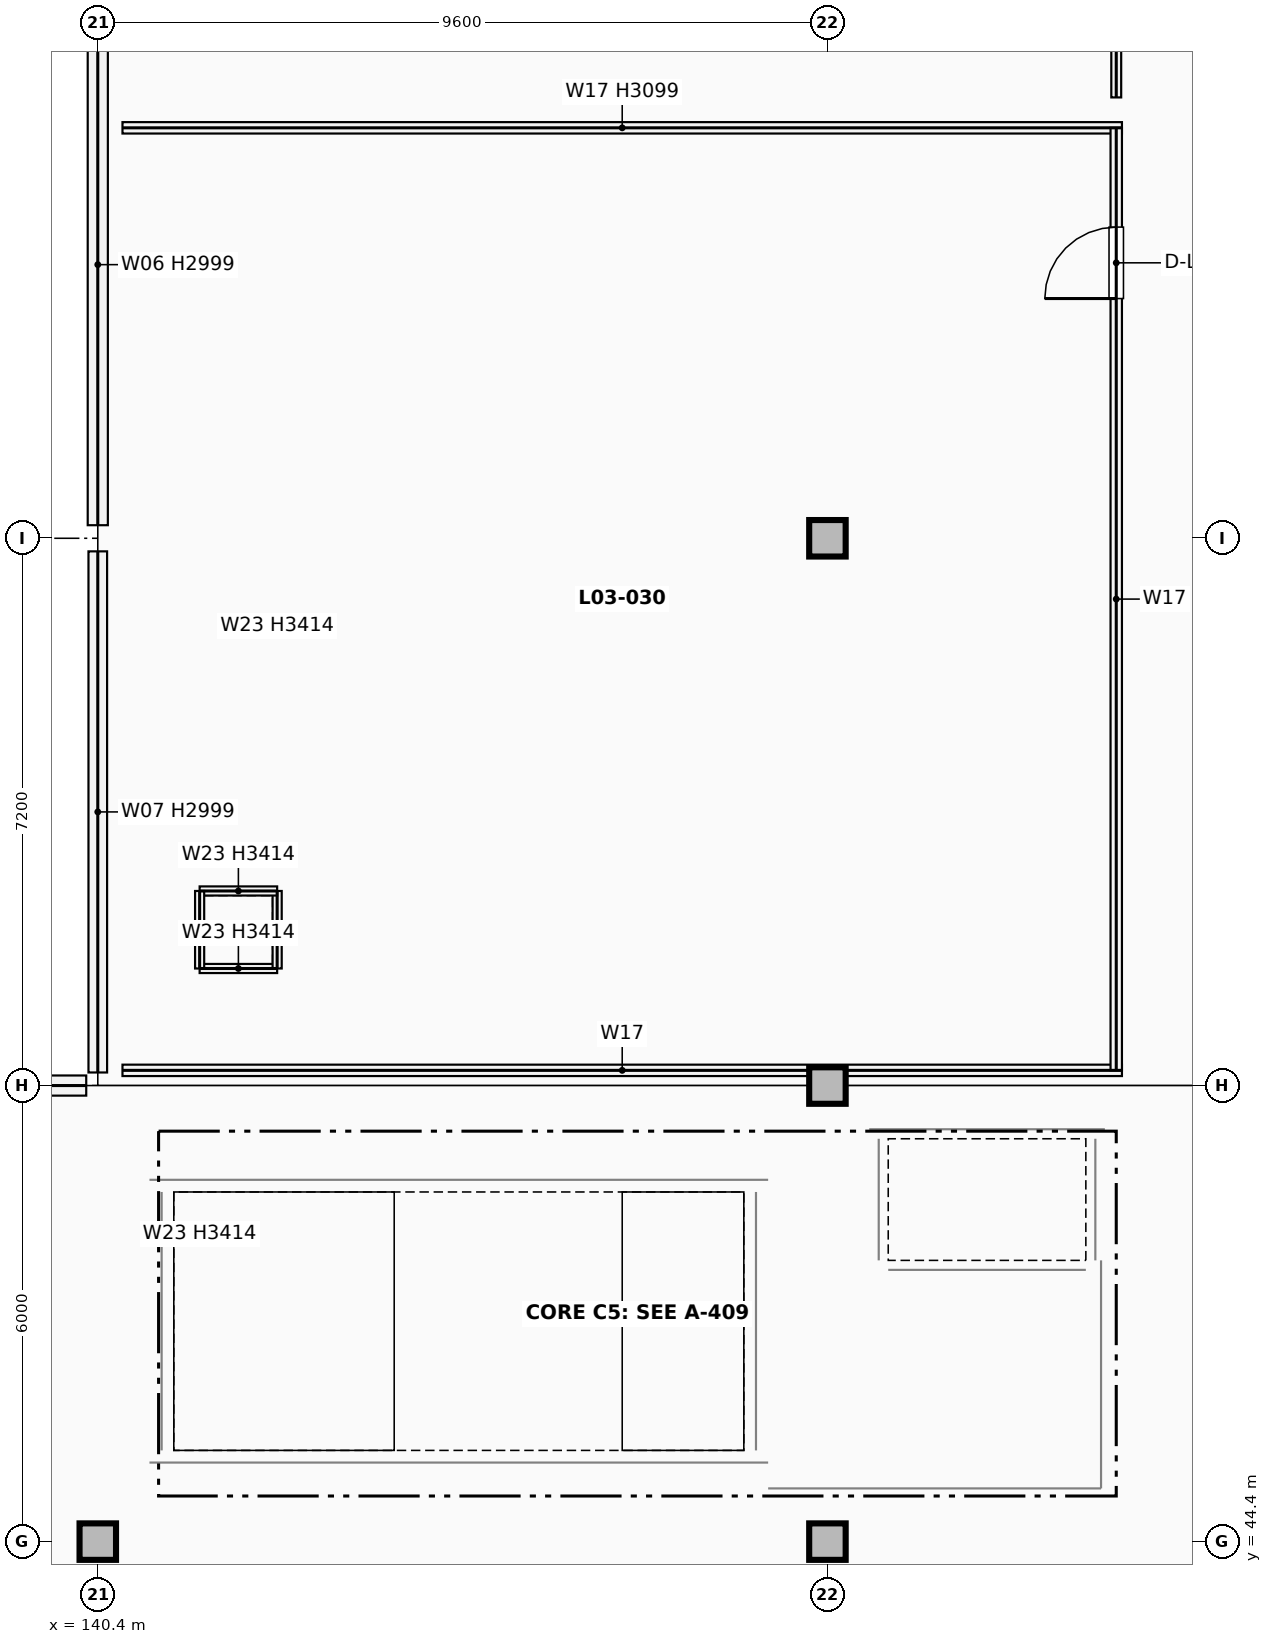
"""IFC4 building model, lengths in metres.
Left out: names, types, materials, properties, quantities, classifications, styles, units other than length and angle.
Written with IfcOpenShell. Run it as: python <this file> out.ifc"""

import sys

from ifc_helpers import new_model, si_unit, direction, frame, frame_2d, origin, origin_2d, place, context, subcontext, project, spatial, rectangle, extrude, element, fill, save


model = new_model("IFC4")
c1 = context("Model", 3, precision=1e-05, world=origin(), true_north=direction((0.0, 1.0)))
c2 = subcontext(c1, "Body", "Model", "MODEL_VIEW")
j1 = project(units=[si_unit("LENGTHUNIT", "METRE"), si_unit("PLANEANGLEUNIT", "RADIAN")], contexts=[c1])
p1 = place(None, origin())
s1 = spatial("IfcSite", under=j1, at=p1, CompositionType="ELEMENT")
p2 = place(p1, origin())
s2 = spatial("IfcBuilding", under=s1, at=p2, CompositionType="ELEMENT")
p3 = place(p2, frame((0.0, 0.0, 13.6)))
s3 = spatial("IfcBuildingStorey", under=s2, at=p3, CompositionType="ELEMENT", Elevation=13.6)
for number, where, z_axis, x_axis in (
    (1, (140.4, 44.4, 0.0), (0.0, 0.0, 1.0), (1.0, 0.0, 0.0)),
    (2, (150.0, 44.4, 0.0), (0.0, 0.0, 1.0), (1.0, 0.0, 0.0)),
    (3, (150.0, 50.4, 0.0), (0.0, 0.0, 1.0), (1.0, 0.0, 0.0)),
    (4, (150.0, 57.6, 0.0), (0.0, 0.0, 1.0), (1.0, 0.0, 0.0)),
):
    element("IfcColumn", number, at=place(p3, frame(where, z_axis=z_axis, x_axis=x_axis)), inside=s3, PredefinedType="COLUMN", context=c2, shape_type="SweptSolid", body=[
        extrude(rectangle(XDim=0.48, YDim=0.48, at=origin_2d()), origin(), (0.0, 0.0, 1.0), 3.74),
    ])
p4 = place(p3, frame((131.042, 50.4, 0.0), z_axis=(0.0, 0.0, 1.0), x_axis=(1.0, 0.0, 0.0)))
e5 = element("IfcWall", 5, at=p4, inside=s3, PredefinedType="SOLIDWALL", context=c2, shape_type="SweptSolid", body=[
    extrude(rectangle(XDim=9.206, YDim=0.265, at=frame_2d((4.603, 0.0))), origin(), (0.0, 0.0, 1.0), 2.999),
])
p5 = place(p4, frame((1.734, 0.0, 0.75)))
e6 = element("IfcOpeningElement", 6, at=p5, cuts=e5, PredefinedType="OPENING", context=c2, shape_type="SweptSolid", body=[
    extrude(rectangle(XDim=1.05, YDim=1.5, at=frame_2d((0.525, 0.75))), frame((0.0, 0.143, 0.0), z_axis=(0.0, -1.0, 0.0), x_axis=(1.0, 0.0, 0.0)), (0.0, 0.0, 1.0), 0.285),
])
p6 = place(p4, frame((4.078, 0.0, 0.75)))
e7 = element("IfcOpeningElement", 7, at=p6, cuts=e5, PredefinedType="OPENING", context=c2, shape_type="SweptSolid", body=[
    extrude(rectangle(XDim=1.05, YDim=1.5, at=frame_2d((0.525, 0.75))), frame((0.0, 0.143, 0.0), z_axis=(0.0, -1.0, 0.0), x_axis=(1.0, 0.0, 0.0)), (0.0, 0.0, 1.0), 0.285),
])
p7 = place(p4, frame((6.422, 0.0, 0.75)))
e8 = element("IfcOpeningElement", 8, at=p7, cuts=e5, PredefinedType="OPENING", context=c2, shape_type="SweptSolid", body=[
    extrude(rectangle(XDim=1.05, YDim=1.5, at=frame_2d((0.525, 0.75))), frame((0.0, 0.143, 0.0), z_axis=(0.0, -1.0, 0.0), x_axis=(1.0, 0.0, 0.0)), (0.0, 0.0, 1.0), 0.285),
])
p8 = place(p3, frame((140.4, 50.572, 0.0), z_axis=(0.0, 0.0, 1.0), x_axis=(0.0, 1.0, 0.0)))
e9 = element("IfcWall", 9, at=p8, inside=s3, PredefinedType="SOLIDWALL", context=c2, shape_type="SweptSolid", body=[
    extrude(rectangle(XDim=6.856, YDim=0.245, at=frame_2d((3.428, 0.0))), origin(), (0.0, 0.0, 1.0), 2.999),
])
p9 = place(p3, frame((140.4, 57.772, 0.0), z_axis=(0.0, 0.0, 1.0), x_axis=(0.0, 1.0, 0.0)))
e10 = element("IfcWall", 10, at=p9, inside=s3, PredefinedType="SOLIDWALL", context=c2, shape_type="SweptSolid", body=[
    extrude(rectangle(XDim=6.856, YDim=0.265, at=frame_2d((3.428, 0.0))), origin(), (0.0, 0.0, 1.0), 2.999),
])
for number, where, z_axis, x_axis in (
    (11, (141.74, 51.94, 0.0), (0.0, 0.0, 1.0), (1.0, 0.0, 0.0)),
    (12, (142.76, 51.94, 0.0), (0.0, 0.0, 1.0), (0.0, 1.0, 0.0)),
    (13, (142.76, 52.96, 0.0), (0.0, 0.0, 1.0), (-1.0, 0.0, 0.0)),
    (14, (141.74, 52.96, 0.0), (0.0, 0.0, 1.0), (0.0, -1.0, 0.0)),
):
    element("IfcWall", number, at=place(p3, frame(where, z_axis=z_axis, x_axis=x_axis)), inside=s3, PredefinedType="PARTITIONING", context=c2, shape_type="SweptSolid", body=[
        extrude(rectangle(XDim=1.02, YDim=0.12, at=frame_2d((0.51, 0.0))), origin(), (0.0, 0.0, 1.0), 3.414),
    ])
p10 = place(p3, frame((141.24, 45.6, 0.0), z_axis=(0.0, 0.0, 1.0), x_axis=(0.0, 1.0, 0.0)))
e15 = element("IfcWall", 15, at=p10, inside=s3, PredefinedType="SHEAR", context=c2, shape_type="SweptSolid", body=[
    extrude(rectangle(XDim=3.4, YDim=0.32, at=frame_2d((1.7, 0.0))), origin(), (0.0, 0.0, 1.0), 3.74),
])
for number, where, z_axis, x_axis in (
    (16, (141.08, 45.44, 0.0), (0.0, 0.0, 1.0), (1.0, 0.0, 0.0)),
    (17, (141.08, 49.16, 0.0), (0.0, 0.0, 1.0), (1.0, 0.0, 0.0)),
):
    element("IfcWall", number, at=place(p3, frame(where, z_axis=z_axis, x_axis=x_axis)), inside=s3, PredefinedType="SHEAR", context=c2, shape_type="SweptSolid", body=[
        extrude(rectangle(XDim=8.14, YDim=0.32, at=frame_2d((4.07, 0.0))), origin(), (0.0, 0.0, 1.0), 3.74),
    ])
p11 = place(p3, frame((149.06, 45.6, 0.0), z_axis=(0.0, 0.0, 1.0), x_axis=(0.0, 1.0, 0.0)))
e18 = element("IfcWall", 18, at=p11, inside=s3, PredefinedType="SHEAR", context=c2, shape_type="SweptSolid", body=[
    extrude(rectangle(XDim=3.4, YDim=0.32, at=frame_2d((1.7, 0.0))), origin(), (0.0, 0.0, 1.0), 3.74),
])
p12 = place(p11, frame((0.65, 0.0, 0.0)))
e19 = element("IfcOpeningElement", 19, at=p12, cuts=e18, PredefinedType="OPENING", context=c2, shape_type="SweptSolid", body=[
    extrude(rectangle(XDim=1.2, YDim=2.2, at=frame_2d((0.6, 1.1))), frame((0.0, 0.17, 0.0), z_axis=(0.0, -1.0, 0.0), x_axis=(1.0, 0.0, 0.0)), (0.0, 0.0, 1.0), 0.34),
])
for number, where, z_axis, x_axis in (
    (20, (150.675, 48.1, 0.0), (0.0, 0.0, 1.0), (0.0, 1.0, 0.0)),
    (21, (153.525, 48.1, 0.0), (0.0, 0.0, 1.0), (0.0, 1.0, 0.0)),
):
    element("IfcWall", number, at=place(p3, frame(where, z_axis=z_axis, x_axis=x_axis)), inside=s3, PredefinedType="SHEAR", context=c2, shape_type="SweptSolid", body=[
        extrude(rectangle(XDim=1.6, YDim=0.25, at=frame_2d((0.8, 0.0))), origin(), (0.0, 0.0, 1.0), 3.74),
    ])
p13 = place(p3, frame((150.55, 49.825, 0.0), z_axis=(0.0, 0.0, 1.0), x_axis=(1.0, 0.0, 0.0)))
e22 = element("IfcWall", 22, at=p13, inside=s3, PredefinedType="SHEAR", context=c2, shape_type="SweptSolid", body=[
    extrude(rectangle(XDim=3.1, YDim=0.25, at=frame_2d((1.55, 0.0))), origin(), (0.0, 0.0, 1.0), 3.74),
])
p14 = place(p3, frame((150.8, 47.975, 0.0), z_axis=(0.0, 0.0, 1.0), x_axis=(1.0, 0.0, 0.0)))
e23 = element("IfcWall", 23, at=p14, inside=s3, PredefinedType="SHEAR", context=c2, shape_type="SweptSolid", body=[
    extrude(rectangle(XDim=2.6, YDim=0.25, at=frame_2d((1.3, 0.0))), origin(), (0.0, 0.0, 1.0), 3.74),
])
p15 = place(p14, frame((0.75, 0.0, 0.0)))
e24 = element("IfcOpeningElement", 24, at=p15, cuts=e23, PredefinedType="OPENING", context=c2, shape_type="SweptSolid", body=[
    extrude(rectangle(XDim=1.1, YDim=2.15, at=frame_2d((0.55, 1.075))), frame((0.0, 0.135, 0.0), z_axis=(0.0, -1.0, 0.0), x_axis=(1.0, 0.0, 0.0)), (0.0, 0.0, 1.0), 0.27),
])
p16 = place(p3, frame((153.6, 45.1, 0.0), z_axis=(0.0, 0.0, 1.0), x_axis=(0.0, 1.0, 0.0)))
e25 = element("IfcWall", 25, at=p16, inside=s3, PredefinedType="PARTITIONING", context=c2, shape_type="SweptSolid", body=[
    extrude(rectangle(XDim=3.0, YDim=0.2, at=frame_2d((1.5, 0.0))), origin(), (0.0, 0.0, 1.0), 3.099),
])
p17 = place(p16, frame((0.775, 0.0, 0.0)))
e26 = element("IfcOpeningElement", 26, at=p17, cuts=e25, PredefinedType="OPENING", context=c2, shape_type="SweptSolid", body=[
    extrude(rectangle(XDim=1.45, YDim=2.2, at=frame_2d((0.725, 1.1))), frame((0.0, 0.11, 0.0), z_axis=(0.0, -1.0, 0.0), x_axis=(1.0, 0.0, 0.0)), (0.0, 0.0, 1.0), 0.22),
])
p18 = place(p3, frame((149.22, 45.1, 0.0), z_axis=(0.0, 0.0, 1.0), x_axis=(1.0, 0.0, 0.0)))
e27 = element("IfcWall", 27, at=p18, inside=s3, PredefinedType="PARTITIONING", context=c2, shape_type="SweptSolid", body=[
    extrude(rectangle(XDim=4.38, YDim=0.2, at=frame_2d((2.19, 0.0))), origin(), (0.0, 0.0, 1.0), 3.099),
])
p19 = place(p3, frame((140.725, 50.6, 0.0), z_axis=(0.0, 0.0, 1.0), x_axis=(1.0, 0.0, 0.0)))
e28 = element("IfcWall", 28, at=p19, inside=s3, PredefinedType="PARTITIONING", context=c2, shape_type="SweptSolid", body=[
    extrude(rectangle(XDim=13.15, YDim=0.15, at=frame_2d((6.575, 0.0))), origin(), (0.0, 0.0, 1.0), 2.809),
])
p20 = place(p3, frame((140.725, 63.0, 0.0), z_axis=(0.0, 0.0, 1.0), x_axis=(1.0, 0.0, 0.0)))
e29 = element("IfcWall", 29, at=p20, inside=s3, PredefinedType="PARTITIONING", context=c2, shape_type="SweptSolid", body=[
    extrude(rectangle(XDim=13.15, YDim=0.15, at=frame_2d((6.575, 0.0))), origin(), (0.0, 0.0, 1.0), 3.099),
])
p21 = place(p3, frame((153.8, 50.6, 0.0), z_axis=(0.0, 0.0, 1.0), x_axis=(0.0, 1.0, 0.0)))
e30 = element("IfcWall", 30, at=p21, inside=s3, PredefinedType="PARTITIONING", context=c2, shape_type="SweptSolid", body=[
    extrude(rectangle(XDim=12.4, YDim=0.15, at=frame_2d((6.2, 0.0))), origin(), (0.0, 0.0, 1.0), 2.809),
])
p22 = place(p21, frame((10.154, 0.0, 0.0)))
e31 = element("IfcOpeningElement", 31, at=p22, cuts=e30, PredefinedType="OPENING", context=c2, shape_type="SweptSolid", body=[
    extrude(rectangle(XDim=0.94, YDim=2.1, at=frame_2d((0.47, 1.05))), frame((0.0, 0.085, 0.0), z_axis=(0.0, -1.0, 0.0), x_axis=(1.0, 0.0, 0.0)), (0.0, 0.0, 1.0), 0.17),
])
p23 = place(p3, frame((153.8, 63.4, 0.0), z_axis=(0.0, 0.0, 1.0), x_axis=(0.0, 1.0, 0.0)))
e32 = element("IfcWall", 32, at=p23, inside=s3, PredefinedType="PARTITIONING", context=c2, shape_type="SweptSolid", body=[
    extrude(rectangle(XDim=15.6, YDim=0.13, at=frame_2d((7.8, 0.0))), origin(), (0.0, 0.0, 1.0), 2.809),
])
p24 = place(p23, frame((3.73, 0.0, 0.0)))
e33 = element("IfcOpeningElement", 33, at=p24, cuts=e32, PredefinedType="OPENING", context=c2, shape_type="SweptSolid", body=[
    extrude(rectangle(XDim=1.08, YDim=2.16, at=frame_2d((0.54, 1.08))), frame((0.0, 0.075, 0.0), z_axis=(0.0, -1.0, 0.0), x_axis=(1.0, 0.0, 0.0)), (0.0, 0.0, 1.0), 0.15),
])
p25 = place(p12, origin())
e34 = element("IfcDoor", 34, at=p25, inside=s3, OperationType="SINGLE_SWING_RIGHT", PredefinedType="DOOR", context=c2, shape_type="SweptSolid", body=[
    extrude(rectangle(XDim=1.2, YDim=2.2, at=frame_2d((0.6, 1.1))), frame((0.0, 0.025, 0.0), z_axis=(0.0, -1.0, 0.0), x_axis=(1.0, 0.0, 0.0)), (0.0, 0.0, 1.0), 0.05),
])
fill(e19, e34)
p26 = place(p15, origin())
e35 = element("IfcDoor", 35, at=p26, inside=s3, OperationType="DOUBLE_DOOR_SLIDING", PredefinedType="DOOR", context=c2, shape_type="SweptSolid", body=[
    extrude(rectangle(XDim=1.1, YDim=2.15, at=frame_2d((0.55, 1.075))), frame((0.0, 0.025, 0.0), z_axis=(0.0, -1.0, 0.0), x_axis=(1.0, 0.0, 0.0)), (0.0, 0.0, 1.0), 0.05),
])
fill(e24, e35)
p27 = place(p17, frame((1.45, 0.0, 0.0), z_axis=(0.0, 0.0, 1.0), x_axis=(-1.0, 0.0, 0.0)))
e36 = element("IfcDoor", 36, at=p27, inside=s3, OperationType="DOUBLE_DOOR_SINGLE_SWING", PredefinedType="DOOR", context=c2, shape_type="SweptSolid", body=[
    extrude(rectangle(XDim=1.45, YDim=2.2, at=frame_2d((0.725, 1.1))), frame((0.0, 0.025, 0.0), z_axis=(0.0, -1.0, 0.0), x_axis=(1.0, 0.0, 0.0)), (0.0, 0.0, 1.0), 0.05),
])
fill(e26, e36)
p28 = place(p22, origin())
e37 = element("IfcDoor", 37, at=p28, inside=s3, OperationType="SINGLE_SWING_LEFT", PredefinedType="DOOR", context=c2, shape_type="SweptSolid", body=[
    extrude(rectangle(XDim=0.94, YDim=2.1, at=frame_2d((0.47, 1.05))), frame((0.0, 0.025, 0.0), z_axis=(0.0, -1.0, 0.0), x_axis=(1.0, 0.0, 0.0)), (0.0, 0.0, 1.0), 0.05),
])
fill(e31, e37)
save(model, sys.argv[1])
